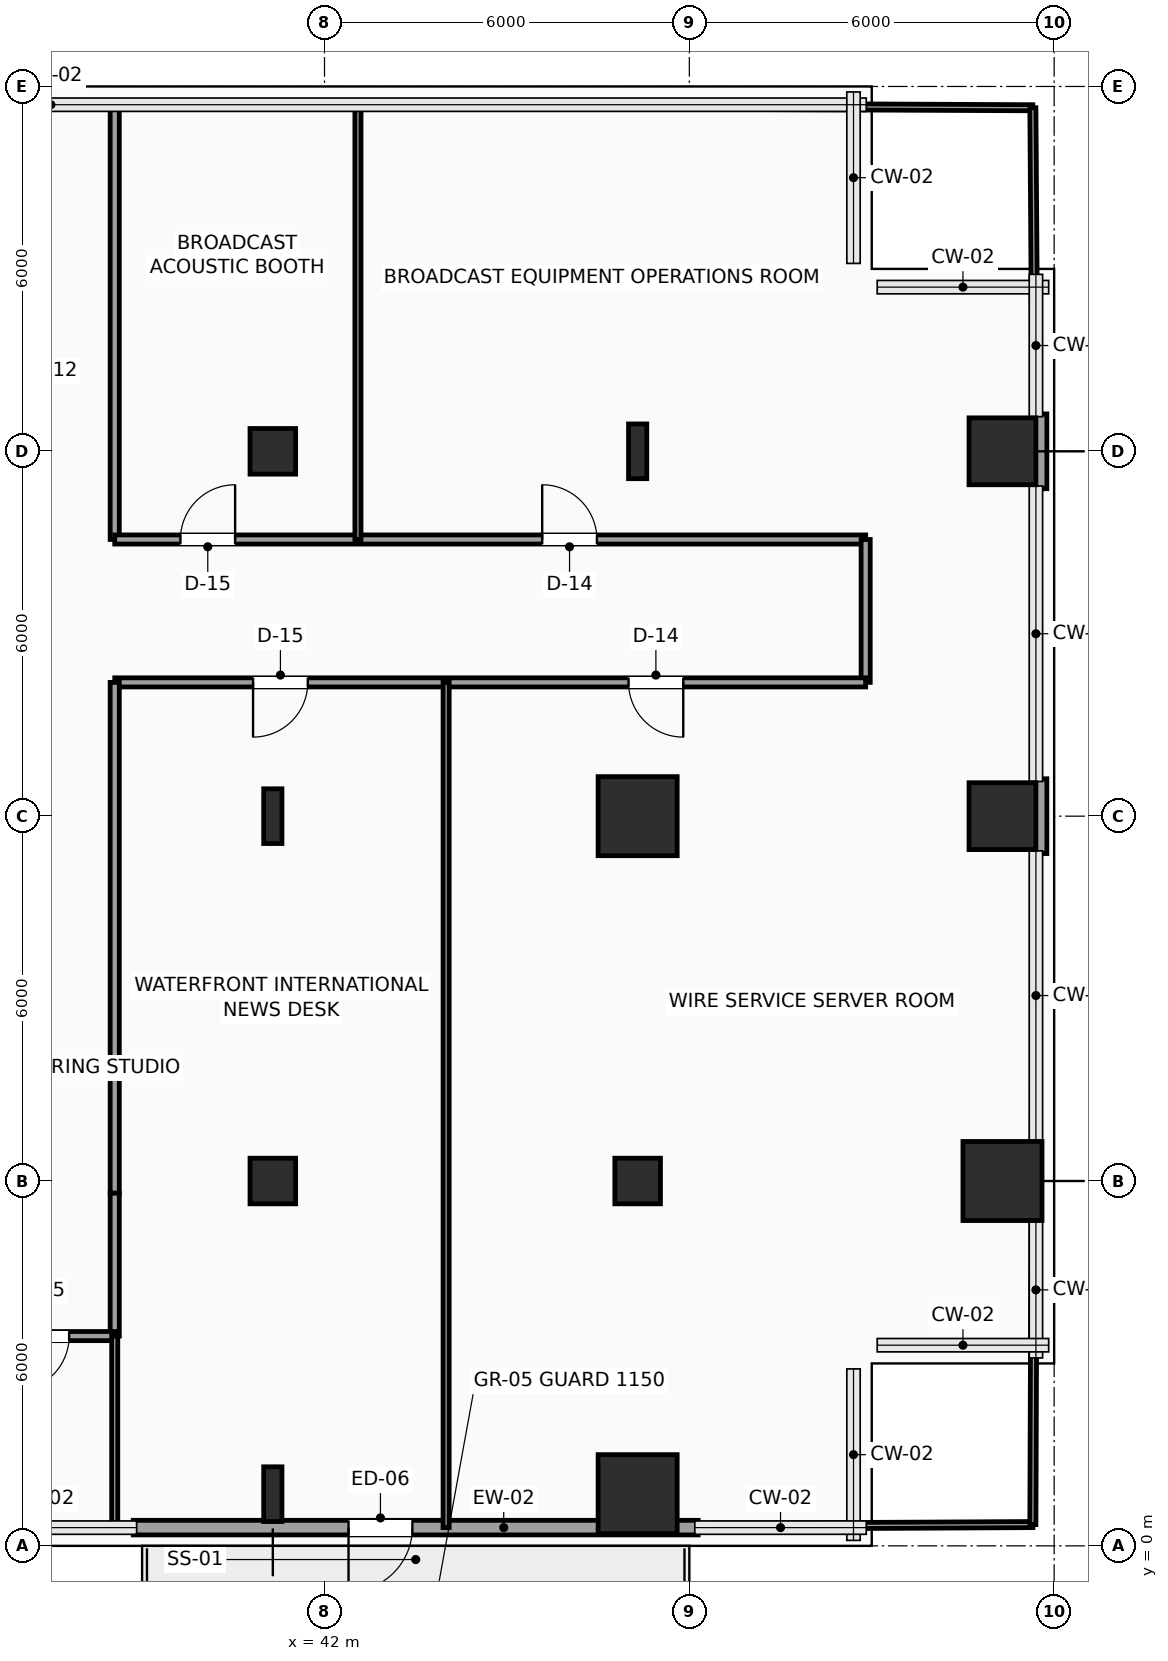
"""IFC4 building model, lengths in metres.
Left out: names, types, materials, properties, quantities, classifications, styles, units other than length and angle.
Written with IfcOpenShell. Run it as: python <this file> out.ifc"""

import sys

from ifc_helpers import new_model, si_unit, direction, frame, frame_2d, origin, origin_2d, place, context, subcontext, project, spatial, rectangle, hollow_rectangle, i_section, extrude, element, fill, save


model = new_model("IFC4")
c1 = context("Model", 3, precision=1e-05, world=origin(), true_north=direction((0.0, 1.0)))
c2 = subcontext(c1, "Body", "Model", "MODEL_VIEW")
j1 = project(units=[si_unit("LENGTHUNIT", "METRE"), si_unit("PLANEANGLEUNIT", "RADIAN")], contexts=[c1])
p1 = place(None, origin())
s1 = spatial("IfcSite", under=j1, at=p1, CompositionType="ELEMENT")
p2 = place(p1, origin())
s2 = spatial("IfcBuilding", under=s1, at=p2, CompositionType="ELEMENT")
p3 = place(p2, frame((0.0, 0.0, 40.2)))
s3 = spatial("IfcBuildingStorey", under=s2, at=p3, CompositionType="ELEMENT", Elevation=40.2)
p4 = place(p3, frame((41.15, 0.85, 0.0), z_axis=(0.0, 0.0, 1.0), x_axis=(1.0, 0.0, 0.0)))
e1 = element("IfcColumn", 1, at=p4, inside=s3, PredefinedType="COLUMN", context=c2, shape_type="SweptSolid", body=[
    extrude(i_section(OverallWidth=0.3, OverallDepth=0.9, WebThickness=0.019, FlangeThickness=0.035, FilletRadius=0.03, at=origin_2d()), origin(), (0.0, 0.0, 1.0), 3.9),
])
p5 = place(p3, frame((41.15, 6.0, 0.0), z_axis=(0.0, 0.0, 1.0), x_axis=(1.0, 0.0, 0.0)))
e2 = element("IfcColumn", 2, at=p5, inside=s3, PredefinedType="COLUMN", context=c2, shape_type="SweptSolid", body=[
    extrude(hollow_rectangle(XDim=0.75, YDim=0.75, WallThickness=0.035, InnerFilletRadius=0.035, OuterFilletRadius=0.05, at=origin_2d()), origin(), (0.0, 0.0, 1.0), 3.9),
])
p6 = place(p3, frame((41.15, 12.0, 0.0), z_axis=(0.0, 0.0, 1.0), x_axis=(1.0, 0.0, 0.0)))
e3 = element("IfcColumn", 3, at=p6, inside=s3, PredefinedType="COLUMN", context=c2, shape_type="SweptSolid", body=[
    extrude(i_section(OverallWidth=0.3, OverallDepth=0.9, WebThickness=0.019, FlangeThickness=0.035, FilletRadius=0.03, at=origin_2d()), origin(), (0.0, 0.0, 1.0), 3.9),
])
p7 = place(p3, frame((41.15, 18.0, 0.0), z_axis=(0.0, 0.0, 1.0), x_axis=(1.0, 0.0, 0.0)))
e4 = element("IfcColumn", 4, at=p7, inside=s3, PredefinedType="COLUMN", context=c2, shape_type="SweptSolid", body=[
    extrude(hollow_rectangle(XDim=0.75, YDim=0.75, WallThickness=0.035, InnerFilletRadius=0.035, OuterFilletRadius=0.05, at=origin_2d()), origin(), (0.0, 0.0, 1.0), 3.9),
])
p8 = place(p3, frame((47.15, 0.85, 0.0), z_axis=(0.0, 0.0, 1.0), x_axis=(1.0, 0.0, 0.0)))
e5 = element("IfcColumn", 5, at=p8, inside=s3, PredefinedType="COLUMN", context=c2, shape_type="SweptSolid", body=[
    extrude(rectangle(XDim=1.3, YDim=1.3, at=origin_2d()), origin(), (0.0, 0.0, 1.0), 3.9),
])
p9 = place(p3, frame((47.15, 6.0, 0.0), z_axis=(0.0, 0.0, 1.0), x_axis=(1.0, 0.0, 0.0)))
e6 = element("IfcColumn", 6, at=p9, inside=s3, PredefinedType="COLUMN", context=c2, shape_type="SweptSolid", body=[
    extrude(hollow_rectangle(XDim=0.75, YDim=0.75, WallThickness=0.035, InnerFilletRadius=0.035, OuterFilletRadius=0.05, at=origin_2d()), origin(), (0.0, 0.0, 1.0), 3.9),
])
p10 = place(p3, frame((47.15, 12.0, 0.0), z_axis=(0.0, 0.0, 1.0), x_axis=(1.0, 0.0, 0.0)))
e7 = element("IfcColumn", 7, at=p10, inside=s3, PredefinedType="COLUMN", context=c2, shape_type="SweptSolid", body=[
    extrude(rectangle(XDim=1.3, YDim=1.3, at=origin_2d()), origin(), (0.0, 0.0, 1.0), 3.9),
])
p11 = place(p3, frame((47.15, 18.0, 0.0), z_axis=(0.0, 0.0, 1.0), x_axis=(1.0, 0.0, 0.0)))
e8 = element("IfcColumn", 8, at=p11, inside=s3, PredefinedType="COLUMN", context=c2, shape_type="SweptSolid", body=[
    extrude(i_section(OverallWidth=0.3, OverallDepth=0.9, WebThickness=0.019, FlangeThickness=0.035, FilletRadius=0.03, at=origin_2d()), origin(), (0.0, 0.0, 1.0), 3.9),
])
p12 = place(p3, frame((53.15, 6.0, 0.0), z_axis=(0.0, 0.0, 1.0), x_axis=(1.0, 0.0, 0.0)))
e9 = element("IfcColumn", 9, at=p12, inside=s3, PredefinedType="COLUMN", context=c2, shape_type="SweptSolid", body=[
    extrude(rectangle(XDim=1.3, YDim=1.3, at=origin_2d()), origin(), (0.0, 0.0, 1.0), 3.9),
])
for number, where, z_axis, x_axis in (
    (10, (53.15, 12.0, 0.0), (0.0, 0.0, 1.0), (1.0, 0.0, 0.0)),
    (11, (53.15, 18.0, 0.0), (0.0, 0.0, 1.0), (1.0, 0.0, 0.0)),
):
    element("IfcColumn", number, at=place(p3, frame(where, z_axis=z_axis, x_axis=x_axis)), inside=s3, PredefinedType="COLUMN", context=c2, shape_type="SweptSolid", body=[
        extrude(rectangle(XDim=1.1, YDim=1.1, at=origin_2d()), origin(), (0.0, 0.0, 1.0), 3.9),
    ])
p13 = place(p3, frame((48.145, 0.3, 0.0), z_axis=(0.0, 0.0, 1.0), x_axis=(-1.0, 0.0, 0.0)))
e12 = element("IfcWall", 12, at=p13, inside=s3, PredefinedType="SOLIDWALL", context=c2, shape_type="SweptSolid", body=[
    extrude(rectangle(XDim=9.29, YDim=0.24, at=frame_2d((4.645, 0.0))), origin(), (0.0, 0.0, 1.0), 3.65),
])
p14 = place(p13, frame((4.7, 0.0, 0.0)))
e13 = element("IfcOpeningElement", 13, at=p14, cuts=e12, PredefinedType="OPENING", context=c2, shape_type="SweptSolid", body=[
    extrude(rectangle(XDim=1.05, YDim=2.2, at=frame_2d((0.525, 1.1))), frame((0.0, 0.13, 0.0), z_axis=(0.0, -1.0, 0.0), x_axis=(1.0, 0.0, 0.0)), (0.0, 0.0, 1.0), 0.26),
])
for number, where, z_axis, x_axis in (
    (14, (53.76, 18.615, 0.0), (0.0, 0.0, 1.0), (0.0, -1.0, 0.0)),
    (15, (53.76, 12.615, 0.0), (0.0, 0.0, 1.0), (0.0, -1.0, 0.0)),
):
    element("IfcWall", number, at=place(p3, frame(where, z_axis=z_axis, x_axis=x_axis)), inside=s3, PredefinedType="SOLIDWALL", context=c2, shape_type="SweptSolid", body=[
        extrude(rectangle(XDim=1.23, YDim=0.24, at=frame_2d((0.615, 0.0))), origin(), (0.0, 0.0, 1.0), 3.65),
    ])
p15 = place(p3, frame((38.55, 23.7, 0.0), z_axis=(0.0, 0.0, 1.0), x_axis=(0.0, -1.0, 0.0)))
e16 = element("IfcWall", 16, at=p15, inside=s3, PredefinedType="PARTITIONING", context=c2, shape_type="SweptSolid", body=[
    extrude(rectangle(XDim=7.15, YDim=0.15, at=frame_2d((3.575, 0.0))), origin(), (0.0, 0.0, 1.0), 3.65),
])
p16 = place(p3, frame((38.55, 16.55, 0.0), z_axis=(0.0, 0.0, 1.0), x_axis=(1.0, 0.0, 0.0)))
e17 = element("IfcWall", 17, at=p16, inside=s3, PredefinedType="PARTITIONING", context=c2, shape_type="SweptSolid", body=[
    extrude(rectangle(XDim=12.35, YDim=0.15, at=frame_2d((6.175, 0.0))), origin(), (0.0, 0.0, 1.0), 3.65),
])
p17 = place(p16, frame((1.08, 0.0, 0.0)))
e18 = element("IfcOpeningElement", 18, at=p17, cuts=e17, PredefinedType="OPENING", context=c2, shape_type="SweptSolid", body=[
    extrude(rectangle(XDim=0.9, YDim=2.1, at=frame_2d((0.45, 1.05))), frame((0.0, 0.085, 0.0), z_axis=(0.0, -1.0, 0.0), x_axis=(1.0, 0.0, 0.0)), (0.0, 0.0, 1.0), 0.17),
])
p18 = place(p16, frame((7.03, 0.0, 0.0)))
e19 = element("IfcOpeningElement", 19, at=p18, cuts=e17, PredefinedType="OPENING", context=c2, shape_type="SweptSolid", body=[
    extrude(rectangle(XDim=0.9, YDim=2.1, at=frame_2d((0.45, 1.05))), frame((0.0, 0.085, 0.0), z_axis=(0.0, -1.0, 0.0), x_axis=(1.0, 0.0, 0.0)), (0.0, 0.0, 1.0), 0.17),
])
p19 = place(p3, frame((50.9, 16.55, 0.0), z_axis=(0.0, 0.0, 1.0), x_axis=(0.0, -1.0, 0.0)))
e20 = element("IfcWall", 20, at=p19, inside=s3, PredefinedType="PARTITIONING", context=c2, shape_type="SweptSolid", body=[
    extrude(rectangle(XDim=2.35, YDim=0.15, at=frame_2d((1.175, 0.0))), origin(), (0.0, 0.0, 1.0), 3.65),
])
p20 = place(p3, frame((50.9, 14.2, 0.0), z_axis=(0.0, 0.0, 1.0), x_axis=(-1.0, 0.0, 0.0)))
e21 = element("IfcWall", 21, at=p20, inside=s3, PredefinedType="PARTITIONING", context=c2, shape_type="SweptSolid", body=[
    extrude(rectangle(XDim=12.35, YDim=0.15, at=frame_2d((6.175, 0.0))), origin(), (0.0, 0.0, 1.0), 3.65),
])
p21 = place(p20, frame((9.175, 0.0, 0.0)))
e22 = element("IfcOpeningElement", 22, at=p21, cuts=e21, PredefinedType="OPENING", context=c2, shape_type="SweptSolid", body=[
    extrude(rectangle(XDim=0.9, YDim=2.1, at=frame_2d((0.45, 1.05))), frame((0.0, 0.085, 0.0), z_axis=(0.0, -1.0, 0.0), x_axis=(1.0, 0.0, 0.0)), (0.0, 0.0, 1.0), 0.17),
])
p22 = place(p20, frame((3.0, 0.0, 0.0)))
e23 = element("IfcOpeningElement", 23, at=p22, cuts=e21, PredefinedType="OPENING", context=c2, shape_type="SweptSolid", body=[
    extrude(rectangle(XDim=0.9, YDim=2.1, at=frame_2d((0.45, 1.05))), frame((0.0, 0.085, 0.0), z_axis=(0.0, -1.0, 0.0), x_axis=(1.0, 0.0, 0.0)), (0.0, 0.0, 1.0), 0.17),
])
p23 = place(p3, frame((38.55, 14.2, 0.0), z_axis=(0.0, 0.0, 1.0), x_axis=(0.0, -1.0, 0.0)))
e24 = element("IfcWall", 24, at=p23, inside=s3, PredefinedType="PARTITIONING", context=c2, shape_type="SweptSolid", body=[
    extrude(rectangle(XDim=8.4, YDim=0.15, at=frame_2d((4.2, 0.0))), origin(), (0.0, 0.0, 1.0), 3.65),
])
p24 = place(p3, frame((38.55, 5.8, 0.0), z_axis=(0.0, 0.0, 1.0), x_axis=(0.0, -1.0, 0.0)))
e25 = element("IfcWall", 25, at=p24, inside=s3, PredefinedType="PARTITIONING", context=c2, shape_type="SweptSolid", body=[
    extrude(rectangle(XDim=2.35, YDim=0.15, at=frame_2d((1.175, 0.0))), origin(), (0.0, 0.0, 1.0), 3.65),
])
p25 = place(p3, frame((38.55, 3.45, 0.0), z_axis=(0.0, 0.0, 1.0), x_axis=(-1.0, 0.0, 0.0)))
e26 = element("IfcWall", 26, at=p25, inside=s3, PredefinedType="PARTITIONING", context=c2, shape_type="SweptSolid", body=[
    extrude(rectangle(XDim=2.4, YDim=0.15, at=frame_2d((1.2, 0.0))), origin(), (0.0, 0.0, 1.0), 3.142),
])
p26 = place(p25, frame((0.75, 0.0, 0.0)))
e27 = element("IfcOpeningElement", 27, at=p26, cuts=e26, PredefinedType="OPENING", context=c2, shape_type="SweptSolid", body=[
    extrude(rectangle(XDim=0.9, YDim=2.1, at=frame_2d((0.45, 1.05))), frame((0.0, 0.085, 0.0), z_axis=(0.0, -1.0, 0.0), x_axis=(1.0, 0.0, 0.0)), (0.0, 0.0, 1.0), 0.17),
])
p27 = place(p3, frame((44.0, 0.3, 0.0), z_axis=(0.0, 0.0, 1.0), x_axis=(0.0, 1.0, 0.0)))
e28 = element("IfcWall", 28, at=p27, inside=s3, PredefinedType="PARTITIONING", context=c2, shape_type="SweptSolid", body=[
    extrude(rectangle(XDim=13.9, YDim=0.1, at=frame_2d((6.95, 0.0))), origin(), (0.0, 0.0, 1.0), 3.65),
])
p28 = place(p3, frame((48.145, 0.322, 0.0), z_axis=(0.0, 0.0, 1.0), x_axis=(0.999986537773, 0.005188860428, 0.0)))
e29 = element("IfcWall", 29, at=p28, inside=s3, PredefinedType="PARTITIONING", context=c2, shape_type="SweptSolid", body=[
    extrude(rectangle(XDim=5.505, YDim=0.1, at=frame_2d((2.752, 0.0))), origin(), (0.0, 0.0, 1.0), 3.65),
])
p29 = place(p3, frame((53.65, 0.35, 0.0), z_axis=(0.0, 0.0, 1.0), x_axis=(0.003606251025, 0.999993497456, 0.0)))
e30 = element("IfcWall", 30, at=p29, inside=s3, PredefinedType="PARTITIONING", context=c2, shape_type="SweptSolid", body=[
    extrude(rectangle(XDim=11.035, YDim=0.1, at=frame_2d((5.518, 0.0))), origin(), (0.0, 0.0, 1.0), 3.65),
])
p30 = place(p3, frame((53.694, 12.615, 0.0), z_axis=(0.0, 0.0, 1.0), x_axis=(0.003542799701, 0.999993724265, 0.0)))
e31 = element("IfcWall", 31, at=p30, inside=s3, PredefinedType="PARTITIONING", context=c2, shape_type="SweptSolid", body=[
    extrude(rectangle(XDim=1.585, YDim=0.1, at=frame_2d((0.792, 0.0))), origin(), (0.0, 0.0, 1.0), 3.65),
])
p31 = place(p3, frame((42.55, 16.55, 0.0), z_axis=(0.0, 0.0, 1.0), x_axis=(0.0, 1.0, 0.0)))
e32 = element("IfcWall", 32, at=p31, inside=s3, PredefinedType="PARTITIONING", context=c2, shape_type="SweptSolid", body=[
    extrude(rectangle(XDim=7.15, YDim=0.1, at=frame_2d((3.575, 0.0))), origin(), (0.0, 0.0, 1.0), 3.65),
])
p32 = place(p3, frame((42.55, 23.7, 0.0), z_axis=(0.0, 0.0, 1.0), x_axis=(0.999989834782, -0.004508917104, 0.0)))
e33 = element("IfcWall", 33, at=p32, inside=s3, PredefinedType="PARTITIONING", context=c2, shape_type="SweptSolid", body=[
    extrude(rectangle(XDim=11.1, YDim=0.1, at=frame_2d((5.55, 0.0))), origin(), (0.0, 0.0, 1.0), 3.65),
])
p33 = place(p3, frame((53.7, 16.55, 0.0), z_axis=(0.0, 0.0, 1.0), x_axis=(-0.007017371073, 0.999975377948, 0.0)))
e34 = element("IfcWall", 34, at=p33, inside=s3, PredefinedType="PARTITIONING", context=c2, shape_type="SweptSolid", body=[
    extrude(rectangle(XDim=0.835, YDim=0.1, at=frame_2d((0.417, 0.0))), origin(), (0.0, 0.0, 1.0), 3.65),
])
p34 = place(p3, frame((53.686, 18.615, 0.0), z_axis=(0.0, 0.0, 1.0), x_axis=(-0.007079296972, 0.999974941463, 0.0)))
e35 = element("IfcWall", 35, at=p34, inside=s3, PredefinedType="PARTITIONING", context=c2, shape_type="SweptSolid", body=[
    extrude(rectangle(XDim=5.035, YDim=0.1, at=frame_2d((2.518, 0.0))), origin(), (0.0, 0.0, 1.0), 3.65),
])
p35 = place(p3, frame((38.55, 0.3, 0.0), z_axis=(0.0, 0.0, 1.0), x_axis=(0.0, 1.0, 0.0)))
e36 = element("IfcWall", 36, at=p35, inside=s3, PredefinedType="PARTITIONING", context=c2, shape_type="SweptSolid", body=[
    extrude(rectangle(XDim=3.15, YDim=0.1, at=frame_2d((1.575, 0.0))), origin(), (0.0, 0.0, 1.0), 3.65),
])
p36 = place(p14, origin())
e37 = element("IfcDoor", 37, at=p36, inside=s3, OperationType="SINGLE_SWING_RIGHT", PredefinedType="DOOR", context=c2, shape_type="SweptSolid", body=[
    extrude(rectangle(XDim=1.05, YDim=2.2, at=frame_2d((0.525, 1.1))), frame((0.0, 0.025, 0.0), z_axis=(0.0, -1.0, 0.0), x_axis=(1.0, 0.0, 0.0)), (0.0, 0.0, 1.0), 0.05),
])
fill(e13, e37)
p37 = place(p17, origin())
e38 = element("IfcDoor", 38, at=p37, inside=s3, OperationType="SINGLE_SWING_RIGHT", PredefinedType="DOOR", context=c2, shape_type="SweptSolid", body=[
    extrude(rectangle(XDim=0.9, YDim=2.1, at=frame_2d((0.45, 1.05))), frame((0.0, 0.025, 0.0), z_axis=(0.0, -1.0, 0.0), x_axis=(1.0, 0.0, 0.0)), (0.0, 0.0, 1.0), 0.05),
])
fill(e18, e38)
p38 = place(p18, origin())
e39 = element("IfcDoor", 39, at=p38, inside=s3, OperationType="SINGLE_SWING_LEFT", PredefinedType="DOOR", context=c2, shape_type="SweptSolid", body=[
    extrude(rectangle(XDim=0.9, YDim=2.1, at=frame_2d((0.45, 1.05))), frame((0.0, 0.025, 0.0), z_axis=(0.0, -1.0, 0.0), x_axis=(1.0, 0.0, 0.0)), (0.0, 0.0, 1.0), 0.05),
])
fill(e19, e39)
p39 = place(p21, origin())
e40 = element("IfcDoor", 40, at=p39, inside=s3, OperationType="SINGLE_SWING_RIGHT", PredefinedType="DOOR", context=c2, shape_type="SweptSolid", body=[
    extrude(rectangle(XDim=0.9, YDim=2.1, at=frame_2d((0.45, 1.05))), frame((0.0, 0.025, 0.0), z_axis=(0.0, -1.0, 0.0), x_axis=(1.0, 0.0, 0.0)), (0.0, 0.0, 1.0), 0.05),
])
fill(e22, e40)
p40 = place(p22, origin())
e41 = element("IfcDoor", 41, at=p40, inside=s3, OperationType="SINGLE_SWING_LEFT", PredefinedType="DOOR", context=c2, shape_type="SweptSolid", body=[
    extrude(rectangle(XDim=0.9, YDim=2.1, at=frame_2d((0.45, 1.05))), frame((0.0, 0.025, 0.0), z_axis=(0.0, -1.0, 0.0), x_axis=(1.0, 0.0, 0.0)), (0.0, 0.0, 1.0), 0.05),
])
fill(e23, e41)
p41 = place(p26, origin())
e42 = element("IfcDoor", 42, at=p41, inside=s3, OperationType="SINGLE_SWING_RIGHT", PredefinedType="DOOR", context=c2, shape_type="SweptSolid", body=[
    extrude(rectangle(XDim=0.9, YDim=2.1, at=frame_2d((0.45, 1.05))), frame((0.0, 0.025, 0.0), z_axis=(0.0, -1.0, 0.0), x_axis=(1.0, 0.0, 0.0)), (0.0, 0.0, 1.0), 0.05),
])
fill(e27, e42)
save(model, sys.argv[1])
